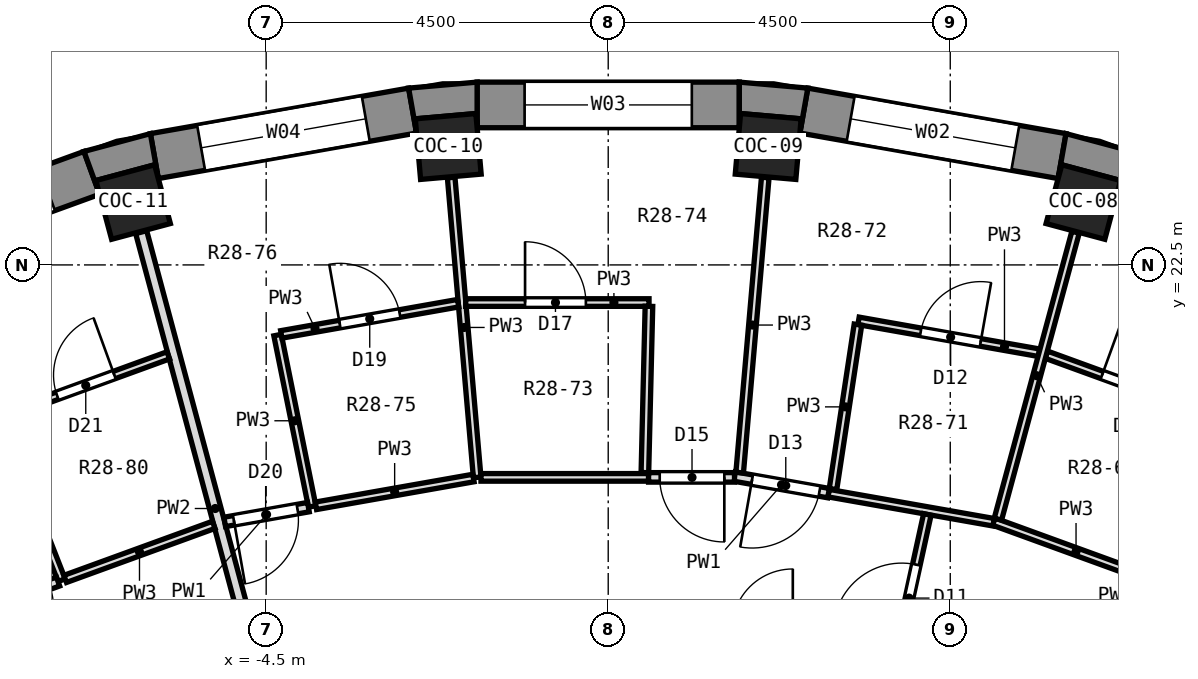
"""IFC4 building model, lengths in metres.
Left out: names, types, materials, properties, quantities, classifications, styles, units other than length and angle.
Written with IfcOpenShell. Run it as: python <this file> out.ifc"""

import sys

from ifc_helpers import new_model, si_unit, direction, frame, frame_2d, origin, origin_2d, place, context, subcontext, project, spatial, polyline, rectangle, outline, extrude, element, fill, save


model = new_model("IFC4")
c1 = context("Model", 3, precision=1e-05, world=origin(), true_north=direction((0.0, 1.0)))
c2 = subcontext(c1, "Body", "Model", "MODEL_VIEW")
j1 = project(units=[si_unit("LENGTHUNIT", "METRE"), si_unit("PLANEANGLEUNIT", "RADIAN")], contexts=[c1])
p1 = place(None, origin())
s1 = spatial("IfcSite", under=j1, at=p1, CompositionType="ELEMENT")
p2 = place(p1, origin())
s2 = spatial("IfcBuilding", under=s1, at=p2, CompositionType="ELEMENT")
p3 = place(p2, frame((0.0, 0.0, 190.5)))
s3 = spatial("IfcBuildingStorey", under=s2, at=p3, CompositionType="ELEMENT", Elevation=190.5)
for number, where, z_axis, x_axis in (
    (1, (6.25, 23.327, 0.0), (0.0, 0.0, 1.0), (0.259, 0.966, 0.0)),
    (2, (2.105, 24.058, 0.0), (0.0, 0.0, 1.0), (0.087, 0.996, 0.0)),
    (3, (-2.105, 24.058, 0.0), (0.0, 0.0, 1.0), (-0.087, 0.996, 0.0)),
    (4, (-6.25, 23.327, 0.0), (0.0, 0.0, 1.0), (-0.259, 0.966, 0.0)),
):
    element("IfcColumn", number, at=place(p3, frame(where, z_axis=z_axis, x_axis=x_axis)), inside=s3, PredefinedType="COLUMN", context=c2, shape_type="SweptSolid", body=[
        extrude(rectangle(XDim=0.8, YDim=0.8, at=origin_2d()), origin(), (0.0, 0.0, 1.0), 3.3),
    ])
p4 = place(p3, frame((10.036, 22.531, 0.0), z_axis=(0.0, 0.0, 1.0), x_axis=(-0.93968799822, 0.342032843455, 0.0)))
e5 = element("IfcWall", 5, at=p4, inside=s3, PredefinedType="SOLIDWALL", context=c2, shape_type="SweptSolid", body=[
    extrude(rectangle(XDim=3.45, YDim=0.6, at=frame_2d((1.725, 0.0))), origin(), (0.0, 0.0, 1.0), 2.85),
])
p5 = place(p4, frame((0.625, 0.0, 0.9)))
e6 = element("IfcOpeningElement", 6, at=p5, cuts=e5, PredefinedType="OPENING", context=c2, shape_type="SweptSolid", body=[
    extrude(rectangle(XDim=2.2, YDim=1.8, at=frame_2d((1.1, 0.9))), frame((0.0, 0.312, 0.0), z_axis=(0.0, -1.0, 0.0), x_axis=(1.0, 0.0, 0.0)), (0.0, 0.0, 1.0), 0.624),
])
p6 = place(p3, frame((5.971, 23.932, 0.0), z_axis=(0.0, 0.0, 1.0), x_axis=(-0.984814892183, 0.173607684551, 0.0)))
e7 = element("IfcWall", 7, at=p6, inside=s3, PredefinedType="SOLIDWALL", context=c2, shape_type="SweptSolid", body=[
    extrude(rectangle(XDim=3.45, YDim=0.6, at=frame_2d((1.725, 0.0))), origin(), (0.0, 0.0, 1.0), 2.85),
])
p7 = place(p6, frame((0.625, 0.0, 0.9)))
e8 = element("IfcOpeningElement", 8, at=p7, cuts=e7, PredefinedType="OPENING", context=c2, shape_type="SweptSolid", body=[
    extrude(rectangle(XDim=2.2, YDim=1.8, at=frame_2d((1.1, 0.9))), frame((0.0, 0.312, 0.0), z_axis=(0.0, -1.0, 0.0), x_axis=(1.0, 0.0, 0.0)), (0.0, 0.0, 1.0), 0.624),
])
p8 = place(p3, frame((1.725, 24.605, 0.0), z_axis=(0.0, 0.0, 1.0), x_axis=(-1.0, 0.0, 0.0)))
e9 = element("IfcWall", 9, at=p8, inside=s3, PredefinedType="SOLIDWALL", context=c2, shape_type="SweptSolid", body=[
    extrude(rectangle(XDim=3.45, YDim=0.6, at=frame_2d((1.725, 0.0))), origin(), (0.0, 0.0, 1.0), 2.85),
])
p9 = place(p8, frame((0.625, 0.0, 0.9)))
e10 = element("IfcOpeningElement", 10, at=p9, cuts=e9, PredefinedType="OPENING", context=c2, shape_type="SweptSolid", body=[
    extrude(rectangle(XDim=2.2, YDim=1.8, at=frame_2d((1.1, 0.9))), frame((0.0, 0.312, 0.0), z_axis=(0.0, -1.0, 0.0), x_axis=(1.0, 0.0, 0.0)), (0.0, 0.0, 1.0), 0.624),
])
p10 = place(p3, frame((-2.574, 24.531, 0.0), z_axis=(0.0, 0.0, 1.0), x_axis=(-0.984814892183, -0.173607684551, 0.0)))
e11 = element("IfcWall", 11, at=p10, inside=s3, PredefinedType="SOLIDWALL", context=c2, shape_type="SweptSolid", body=[
    extrude(rectangle(XDim=3.45, YDim=0.6, at=frame_2d((1.725, 0.0))), origin(), (0.0, 0.0, 1.0), 2.85),
])
p11 = place(p10, frame((0.625, 0.0, 0.9)))
e12 = element("IfcOpeningElement", 12, at=p11, cuts=e11, PredefinedType="OPENING", context=c2, shape_type="SweptSolid", body=[
    extrude(rectangle(XDim=2.2, YDim=1.8, at=frame_2d((1.1, 0.9))), frame((0.0, 0.312, 0.0), z_axis=(0.0, -1.0, 0.0), x_axis=(1.0, 0.0, 0.0)), (0.0, 0.0, 1.0), 0.624),
])
p12 = place(p3, frame((-6.794, 23.711, 0.0), z_axis=(0.0, 0.0, 1.0), x_axis=(-0.93968799822, -0.342032843455, 0.0)))
e13 = element("IfcWall", 13, at=p12, inside=s3, PredefinedType="SOLIDWALL", context=c2, shape_type="SweptSolid", body=[
    extrude(rectangle(XDim=3.45, YDim=0.6, at=frame_2d((1.725, 0.0))), origin(), (0.0, 0.0, 1.0), 2.85),
])
p13 = place(p12, frame((0.625, 0.0, 0.9)))
e14 = element("IfcOpeningElement", 14, at=p13, cuts=e13, PredefinedType="OPENING", context=c2, shape_type="SweptSolid", body=[
    extrude(rectangle(XDim=2.2, YDim=1.8, at=frame_2d((1.1, 0.9))), frame((0.0, 0.312, 0.0), z_axis=(0.0, -1.0, 0.0), x_axis=(1.0, 0.0, 0.0)), (0.0, 0.0, 1.0), 0.624),
])
p14 = place(p3, origin())
e15 = element("IfcWall", 15, at=p14, inside=s3, PredefinedType="SOLIDWALL", context=c2, shape_type="SweptSolid", body=[
    extrude(outline(polyline([(6.023, 24.227), (5.919, 23.636), (5.968, 23.817), (6.74, 23.61), (6.692, 23.429), (6.897, 23.993), (6.023, 24.227)])), origin(), (0.0, 0.0, 1.0), 2.85),
])
p15 = place(p3, origin())
e16 = element("IfcWall", 16, at=p15, inside=s3, PredefinedType="SOLIDWALL", context=c2, shape_type="SweptSolid", body=[
    extrude(outline(polyline([(2.626, 24.826), (1.725, 24.905), (1.725, 24.305), (1.741, 24.491), (2.538, 24.422), (2.522, 24.235), (2.626, 24.826)])), origin(), (0.0, 0.0, 1.0), 2.85),
])
p16 = place(p3, origin())
e17 = element("IfcWall", 17, at=p16, inside=s3, PredefinedType="SOLIDWALL", context=c2, shape_type="SweptSolid", body=[
    extrude(outline(polyline([(-1.725, 24.905), (-2.626, 24.826), (-2.522, 24.235), (-2.538, 24.422), (-1.741, 24.491), (-1.725, 24.305), (-1.725, 24.905)])), origin(), (0.0, 0.0, 1.0), 2.85),
])
p17 = place(p3, origin())
e18 = element("IfcWall", 18, at=p17, inside=s3, PredefinedType="SOLIDWALL", context=c2, shape_type="SweptSolid", body=[
    extrude(outline(polyline([(-6.023, 24.227), (-6.897, 23.993), (-6.692, 23.429), (-6.74, 23.61), (-5.968, 23.817), (-5.919, 23.636), (-6.023, 24.227)])), origin(), (0.0, 0.0, 1.0), 2.85),
])
p18 = place(p3, frame((-2.066, 23.65, 0.0), z_axis=(0.0, 0.0, 1.0), x_axis=(0.086382173885, -0.996262073972, 0.0)))
e19 = element("IfcWall", 19, at=p18, inside=s3, PredefinedType="PARTITIONING", context=c2, shape_type="SweptSolid", body=[
    extrude(rectangle(XDim=3.96, YDim=0.1, at=frame_2d((1.98, 0.0))), origin(), (0.0, 0.0, 1.0), 2.85),
])
p19 = place(p3, frame((-4.35, 21.577, 0.0), z_axis=(0.0, 0.0, 1.0), x_axis=(0.197830277374, -0.980236288532, 0.0)))
e20 = element("IfcWall", 20, at=p19, inside=s3, PredefinedType="PARTITIONING", context=c2, shape_type="SweptSolid", body=[
    extrude(rectangle(XDim=2.3, YDim=0.1, at=frame_2d((1.15, 0.0))), origin(), (0.0, 0.0, 1.0), 2.85),
])
p20 = place(p3, frame((-6.145, 22.931, 0.0), z_axis=(0.0, 0.0, 1.0), x_axis=(0.258855512824, -0.965916054055, 0.0)))
e21 = element("IfcWall", 21, at=p20, inside=s3, PredefinedType="PARTITIONING", context=c2, shape_type="SweptSolid", body=[
    extrude(rectangle(XDim=7.527, YDim=0.15, at=frame_2d((3.764, 0.0))), origin(), (0.0, 0.0, 1.0), 2.85),
])
p21 = place(p3, frame((-8.03, 20.494, 0.0), z_axis=(0.0, 0.0, 1.0), x_axis=(0.364775478286, -0.931095510912, 0.0)))
e22 = element("IfcWall", 22, at=p21, inside=s3, PredefinedType="PARTITIONING", context=c2, shape_type="SweptSolid", body=[
    extrude(rectangle(XDim=2.3, YDim=0.1, at=frame_2d((1.15, 0.0))), origin(), (0.0, 0.0, 1.0), 2.85),
])
p22 = place(p3, frame((5.071, 19.123, 0.0), z_axis=(0.0, 0.0, 1.0), x_axis=(0.939734670151, -0.34190459154, 0.0)))
e23 = element("IfcWall", 23, at=p22, inside=s3, PredefinedType="PARTITIONING", context=c2, shape_type="SweptSolid", body=[
    extrude(rectangle(XDim=2.306, YDim=0.1, at=frame_2d((1.153, 0.0))), origin(), (0.0, 0.0, 1.0), 2.85),
])
p23 = place(p3, frame((5.764, 21.319, 0.0), z_axis=(0.0, 0.0, 1.0), x_axis=(0.939672176826, -0.342076307422, 0.0)))
e24 = element("IfcWall", 24, at=p23, inside=s3, PredefinedType="PARTITIONING", context=c2, shape_type="SweptSolid", body=[
    extrude(rectangle(XDim=2.412, YDim=0.1, at=frame_2d((1.206, 0.0))), origin(), (0.0, 0.0, 1.0), 2.85),
])
p24 = place(p23, frame((0.781, 0.0, 0.0)))
e25 = element("IfcOpeningElement", 25, at=p24, cuts=e24, PredefinedType="OPENING", context=c2, shape_type="SweptSolid", body=[
    extrude(rectangle(XDim=0.8, YDim=2.1, at=frame_2d((0.4, 1.05))), frame((0.0, 0.062, 0.0), z_axis=(0.0, -1.0, 0.0), x_axis=(1.0, 0.0, 0.0)), (0.0, 0.0, 1.0), 0.124),
])
p25 = place(p3, frame((2.899, 19.498, 0.0), z_axis=(0.0, 0.0, 1.0), x_axis=(0.984790246942, -0.173747430277, 0.0)))
e26 = element("IfcWall", 26, at=p25, inside=s3, PredefinedType="PARTITIONING", context=c2, shape_type="SweptSolid", body=[
    extrude(rectangle(XDim=2.205, YDim=0.1, at=frame_2d((1.102, 0.0))), origin(), (0.0, 0.0, 1.0), 2.85),
])
p26 = place(p3, frame((1.662, 19.716, 0.0), z_axis=(0.0, 0.0, 1.0), x_axis=(0.984789427994, -0.173752071961, 0.0)))
e27 = element("IfcWall", 27, at=p26, inside=s3, PredefinedType="PARTITIONING", context=c2, shape_type="SweptSolid", body=[
    extrude(rectangle(XDim=1.256, YDim=0.125, at=frame_2d((0.628, 0.0))), origin(), (0.0, 0.0, 1.0), 2.85),
])
p27 = place(p26, frame((0.235, 0.0, 0.0)))
e28 = element("IfcOpeningElement", 28, at=p27, cuts=e27, PredefinedType="OPENING", context=c2, shape_type="SweptSolid", body=[
    extrude(rectangle(XDim=0.9, YDim=2.1, at=frame_2d((0.45, 1.05))), frame((0.0, 0.074, 0.0), z_axis=(0.0, -1.0, 0.0), x_axis=(1.0, 0.0, 0.0)), (0.0, 0.0, 1.0), 0.149),
])
p28 = place(p3, frame((3.293, 21.764, 0.0), z_axis=(0.0, 0.0, 1.0), x_axis=(0.984775404062, -0.173831537861, 0.0)))
e29 = element("IfcWall", 29, at=p28, inside=s3, PredefinedType="PARTITIONING", context=c2, shape_type="SweptSolid", body=[
    extrude(rectangle(XDim=2.411, YDim=0.1, at=frame_2d((1.206, 0.0))), origin(), (0.0, 0.0, 1.0), 2.85),
])
p29 = place(p28, frame((0.831, 0.0, 0.0)))
e30 = element("IfcOpeningElement", 30, at=p29, cuts=e29, PredefinedType="OPENING", context=c2, shape_type="SweptSolid", body=[
    extrude(rectangle(XDim=0.8, YDim=2.1, at=frame_2d((0.4, 1.05))), frame((0.0, 0.062, 0.0), z_axis=(0.0, -1.0, 0.0), x_axis=(1.0, 0.0, 0.0)), (0.0, 0.0, 1.0), 0.124),
])
p30 = place(p3, frame((-1.674, 19.705, 0.0), z_axis=(0.0, 0.0, 1.0), x_axis=(1.0, 0.0, 0.0)))
e31 = element("IfcWall", 31, at=p30, inside=s3, PredefinedType="PARTITIONING", context=c2, shape_type="SweptSolid", body=[
    extrude(rectangle(XDim=2.205, YDim=0.1, at=frame_2d((1.103, 0.0))), origin(), (0.0, 0.0, 1.0), 2.85),
])
p31 = place(p3, frame((0.531, 19.705, 0.0), z_axis=(0.0, 0.0, 1.0), x_axis=(1.0, 0.0, 0.0)))
e32 = element("IfcWall", 32, at=p31, inside=s3, PredefinedType="PARTITIONING", context=c2, shape_type="SweptSolid", body=[
    extrude(rectangle(XDim=1.131, YDim=0.125, at=frame_2d((0.565, 0.0))), origin(), (0.0, 0.0, 1.0), 2.85),
])
p32 = place(p31, frame((0.146, 0.0, 0.0)))
e33 = element("IfcOpeningElement", 33, at=p32, cuts=e32, PredefinedType="OPENING", context=c2, shape_type="SweptSolid", body=[
    extrude(rectangle(XDim=0.85, YDim=2.1, at=frame_2d((0.425, 1.05))), frame((0.0, 0.074, 0.0), z_axis=(0.0, -1.0, 0.0), x_axis=(1.0, 0.0, 0.0)), (0.0, 0.0, 1.0), 0.149),
])
p33 = place(p3, frame((-1.875, 22.005, 0.0), z_axis=(0.0, 0.0, 1.0), x_axis=(1.0, 0.0, 0.0)))
e34 = element("IfcWall", 34, at=p33, inside=s3, PredefinedType="PARTITIONING", context=c2, shape_type="SweptSolid", body=[
    extrude(rectangle(XDim=2.412, YDim=0.1, at=frame_2d((1.206, 0.0))), origin(), (0.0, 0.0, 1.0), 2.85),
])
p34 = place(p33, frame((0.781, 0.0, 0.0)))
e35 = element("IfcOpeningElement", 35, at=p34, cuts=e34, PredefinedType="OPENING", context=c2, shape_type="SweptSolid", body=[
    extrude(rectangle(XDim=0.8, YDim=2.1, at=frame_2d((0.4, 1.05))), frame((0.0, 0.062, 0.0), z_axis=(0.0, -1.0, 0.0), x_axis=(1.0, 0.0, 0.0)), (0.0, 0.0, 1.0), 0.124),
])
p35 = place(p3, frame((-3.846, 19.331, 0.0), z_axis=(0.0, 0.0, 1.0), x_axis=(0.984784726653, 0.173778716047, 0.0)))
e36 = element("IfcWall", 36, at=p35, inside=s3, PredefinedType="PARTITIONING", context=c2, shape_type="SweptSolid", body=[
    extrude(rectangle(XDim=2.104, YDim=0.1, at=frame_2d((1.052, 0.0))), origin(), (0.0, 0.0, 1.0), 2.85),
])
p36 = place(p3, frame((-5.045, 19.119, 0.0), z_axis=(0.0, 0.0, 1.0), x_axis=(0.984809932548, 0.173635816451, 0.0)))
e37 = element("IfcWall", 37, at=p36, inside=s3, PredefinedType="PARTITIONING", context=c2, shape_type="SweptSolid", body=[
    extrude(rectangle(XDim=1.118, YDim=0.125, at=frame_2d((0.559, 0.0))), origin(), (0.0, 0.0, 1.0), 2.85),
])
p37 = place(p36, frame((0.122, 0.0, 0.0)))
e38 = element("IfcOpeningElement", 38, at=p37, cuts=e37, PredefinedType="OPENING", context=c2, shape_type="SweptSolid", body=[
    extrude(rectangle(XDim=0.85, YDim=2.1, at=frame_2d((0.425, 1.05))), frame((0.0, 0.074, 0.0), z_axis=(0.0, -1.0, 0.0), x_axis=(1.0, 0.0, 0.0)), (0.0, 0.0, 1.0), 0.149),
])
p38 = place(p3, frame((-4.301, 21.586, 0.0), z_axis=(0.0, 0.0, 1.0), x_axis=(0.984779397408, 0.173808913582, 0.0)))
e39 = element("IfcWall", 39, at=p38, inside=s3, PredefinedType="PARTITIONING", context=c2, shape_type="SweptSolid", body=[
    extrude(rectangle(XDim=2.363, YDim=0.1, at=frame_2d((1.181, 0.0))), origin(), (0.0, 0.0, 1.0), 2.85),
])
p39 = place(p38, frame((0.781, 0.0, 0.0)))
e40 = element("IfcOpeningElement", 40, at=p39, cuts=e39, PredefinedType="OPENING", context=c2, shape_type="SweptSolid", body=[
    extrude(rectangle(XDim=0.8, YDim=2.1, at=frame_2d((0.4, 1.05))), frame((0.0, 0.062, 0.0), z_axis=(0.0, -1.0, 0.0), x_axis=(1.0, 0.0, 0.0)), (0.0, 0.0, 1.0), 0.124),
])
p40 = place(p3, frame((-7.144, 18.369, 0.0), z_axis=(0.0, 0.0, 1.0), x_axis=(0.939728291625, 0.341922122596, 0.0)))
e41 = element("IfcWall", 41, at=p40, inside=s3, PredefinedType="PARTITIONING", context=c2, shape_type="SweptSolid", body=[
    extrude(rectangle(XDim=2.08, YDim=0.1, at=frame_2d((1.04, 0.0))), origin(), (0.0, 0.0, 1.0), 2.85),
])
p41 = place(p3, frame((-8.312, 17.944, 0.0), z_axis=(0.0, 0.0, 1.0), x_axis=(0.939699833517, 0.34200032586, 0.0)))
e42 = element("IfcWall", 42, at=p41, inside=s3, PredefinedType="PARTITIONING", context=c2, shape_type="SweptSolid", body=[
    extrude(rectangle(XDim=1.143, YDim=0.125, at=frame_2d((0.571, 0.0))), origin(), (0.0, 0.0, 1.0), 2.85),
])
p42 = place(p41, frame((0.122, 0.0, 0.0)))
e43 = element("IfcOpeningElement", 43, at=p42, cuts=e42, PredefinedType="OPENING", context=c2, shape_type="SweptSolid", body=[
    extrude(rectangle(XDim=0.9, YDim=2.1, at=frame_2d((0.45, 1.05))), frame((0.0, 0.074, 0.0), z_axis=(0.0, -1.0, 0.0), x_axis=(1.0, 0.0, 0.0)), (0.0, 0.0, 1.0), 0.149),
])
p43 = place(p3, frame((-7.983, 20.511, 0.0), z_axis=(0.0, 0.0, 1.0), x_axis=(0.939652995513, 0.342128993251, 0.0)))
e44 = element("IfcWall", 44, at=p43, inside=s3, PredefinedType="PARTITIONING", context=c2, shape_type="SweptSolid", body=[
    extrude(rectangle(XDim=2.336, YDim=0.1, at=frame_2d((1.168, 0.0))), origin(), (0.0, 0.0, 1.0), 2.85),
])
p44 = place(p43, frame((0.781, 0.0, 0.0)))
e45 = element("IfcOpeningElement", 45, at=p44, cuts=e44, PredefinedType="OPENING", context=c2, shape_type="SweptSolid", body=[
    extrude(rectangle(XDim=0.8, YDim=2.1, at=frame_2d((0.4, 1.05))), frame((0.0, 0.062, 0.0), z_axis=(0.0, -1.0, 0.0), x_axis=(1.0, 0.0, 0.0)), (0.0, 0.0, 1.0), 0.124),
])
p45 = place(p3, frame((5.127, 19.156, 0.0), z_axis=(0.0, 0.0, 1.0), x_axis=(0.261236113371, 0.965274931339, 0.0)))
e46 = element("IfcWall", 46, at=p45, inside=s3, PredefinedType="PARTITIONING", context=c2, shape_type="SweptSolid", body=[
    extrude(rectangle(XDim=3.91, YDim=0.1, at=frame_2d((1.955, 0.0))), origin(), (0.0, 0.0, 1.0), 2.85),
])
p46 = place(p3, frame((3.421, 15.661, 0.0), z_axis=(0.0, 0.0, 1.0), x_axis=(0.213434819618, 0.976957306014, 0.0)))
e47 = element("IfcWall", 47, at=p46, inside=s3, PredefinedType="PARTITIONING", context=c2, shape_type="SweptSolid", body=[
    extrude(rectangle(XDim=3.64, YDim=0.1, at=frame_2d((1.82, 0.0))), origin(), (0.0, 0.0, 1.0), 2.85),
])
p47 = place(p46, frame((2.064, 0.0, 0.0)))
e48 = element("IfcOpeningElement", 48, at=p47, cuts=e47, PredefinedType="OPENING", context=c2, shape_type="SweptSolid", body=[
    extrude(rectangle(XDim=0.9, YDim=2.1, at=frame_2d((0.45, 1.05))), frame((0.0, 0.062, 0.0), z_axis=(0.0, -1.0, 0.0), x_axis=(1.0, 0.0, 0.0)), (0.0, 0.0, 1.0), 0.124),
])
p48 = place(p3, frame((2.957, 19.551, 0.0), z_axis=(0.0, 0.0, 1.0), x_axis=(0.149927646316, 0.988696971205, 0.0)))
e49 = element("IfcWall", 49, at=p48, inside=s3, PredefinedType="PARTITIONING", context=c2, shape_type="SweptSolid", body=[
    extrude(rectangle(XDim=2.188, YDim=0.1, at=frame_2d((1.094, 0.0))), origin(), (0.0, 0.0, 1.0), 2.85),
])
p49 = place(p3, frame((1.729, 19.767, 0.0), z_axis=(0.0, 0.0, 1.0), x_axis=(0.086389019771, 0.996261480367, 0.0)))
e50 = element("IfcWall", 50, at=p49, inside=s3, PredefinedType="PARTITIONING", context=c2, shape_type="SweptSolid", body=[
    extrude(rectangle(XDim=3.897, YDim=0.1, at=frame_2d((1.949, 0.0))), origin(), (0.0, 0.0, 1.0), 2.85),
])
p50 = place(p3, frame((0.482, 19.768, 0.0), z_axis=(0.0, 0.0, 1.0), x_axis=(0.024434666623, 0.999701428961, 0.0)))
e51 = element("IfcWall", 51, at=p50, inside=s3, PredefinedType="PARTITIONING", context=c2, shape_type="SweptSolid", body=[
    extrude(rectangle(XDim=2.188, YDim=0.1, at=frame_2d((1.094, 0.0))), origin(), (0.0, 0.0, 1.0), 2.85),
])
p51 = place(p7, origin())
e52 = element("IfcWindow", 52, at=p51, inside=s3, PartitioningType="SINGLE_PANEL", PredefinedType="WINDOW", context=c2, shape_type="SweptSolid", body=[
    extrude(rectangle(XDim=2.2, YDim=1.8, at=frame_2d((1.1, 0.9))), frame((0.0, 0.18, 0.0), z_axis=(0.0, -1.0, 0.0), x_axis=(1.0, 0.0, 0.0)), (0.0, 0.0, 1.0), 0.06),
])
fill(e8, e52)
p52 = place(p9, origin())
e53 = element("IfcWindow", 53, at=p52, inside=s3, PartitioningType="SINGLE_PANEL", PredefinedType="WINDOW", context=c2, shape_type="SweptSolid", body=[
    extrude(rectangle(XDim=2.2, YDim=1.8, at=frame_2d((1.1, 0.9))), frame((0.0, 0.18, 0.0), z_axis=(0.0, -1.0, 0.0), x_axis=(1.0, 0.0, 0.0)), (0.0, 0.0, 1.0), 0.06),
])
fill(e10, e53)
p53 = place(p11, origin())
e54 = element("IfcWindow", 54, at=p53, inside=s3, PartitioningType="SINGLE_PANEL", PredefinedType="WINDOW", context=c2, shape_type="SweptSolid", body=[
    extrude(rectangle(XDim=2.2, YDim=1.8, at=frame_2d((1.1, 0.9))), frame((0.0, 0.18, 0.0), z_axis=(0.0, -1.0, 0.0), x_axis=(1.0, 0.0, 0.0)), (0.0, 0.0, 1.0), 0.06),
])
fill(e12, e54)
p54 = place(p24, origin())
e55 = element("IfcDoor", 55, at=p54, inside=s3, OperationType="SINGLE_SWING_LEFT", PredefinedType="DOOR", context=c2, shape_type="SweptSolid", body=[
    extrude(rectangle(XDim=0.8, YDim=2.1, at=frame_2d((0.4, 1.05))), frame((0.0, 0.025, 0.0), z_axis=(0.0, -1.0, 0.0), x_axis=(1.0, 0.0, 0.0)), (0.0, 0.0, 1.0), 0.05),
])
fill(e25, e55)
p55 = place(p47, origin())
e56 = element("IfcDoor", 56, at=p55, inside=s3, OperationType="SINGLE_SWING_LEFT", PredefinedType="DOOR", context=c2, shape_type="SweptSolid", body=[
    extrude(rectangle(XDim=0.9, YDim=2.1, at=frame_2d((0.45, 1.05))), frame((0.0, 0.025, 0.0), z_axis=(0.0, -1.0, 0.0), x_axis=(1.0, 0.0, 0.0)), (0.0, 0.0, 1.0), 0.05),
])
fill(e48, e56)
p56 = place(p29, origin())
e57 = element("IfcDoor", 57, at=p56, inside=s3, OperationType="SINGLE_SWING_RIGHT", PredefinedType="DOOR", context=c2, shape_type="SweptSolid", body=[
    extrude(rectangle(XDim=0.8, YDim=2.1, at=frame_2d((0.4, 1.05))), frame((0.0, 0.025, 0.0), z_axis=(0.0, -1.0, 0.0), x_axis=(1.0, 0.0, 0.0)), (0.0, 0.0, 1.0), 0.05),
])
fill(e30, e57)
p57 = place(p27, frame((0.9, 0.0, 0.0), z_axis=(0.0, 0.0, 1.0), x_axis=(-1.0, 0.0, 0.0)))
e58 = element("IfcDoor", 58, at=p57, inside=s3, OperationType="SINGLE_SWING_RIGHT", PredefinedType="DOOR", context=c2, shape_type="SweptSolid", body=[
    extrude(rectangle(XDim=0.9, YDim=2.1, at=frame_2d((0.45, 1.05))), frame((0.0, 0.025, 0.0), z_axis=(0.0, -1.0, 0.0), x_axis=(1.0, 0.0, 0.0)), (0.0, 0.0, 1.0), 0.05),
])
fill(e28, e58)
p58 = place(p32, frame((0.85, 0.0, 0.0), z_axis=(0.0, 0.0, 1.0), x_axis=(-1.0, 0.0, 0.0)))
e59 = element("IfcDoor", 59, at=p58, inside=s3, OperationType="SINGLE_SWING_LEFT", PredefinedType="DOOR", context=c2, shape_type="SweptSolid", body=[
    extrude(rectangle(XDim=0.85, YDim=2.1, at=frame_2d((0.425, 1.05))), frame((0.0, 0.025, 0.0), z_axis=(0.0, -1.0, 0.0), x_axis=(1.0, 0.0, 0.0)), (0.0, 0.0, 1.0), 0.05),
])
fill(e33, e59)
p59 = place(p34, origin())
e60 = element("IfcDoor", 60, at=p59, inside=s3, OperationType="SINGLE_SWING_LEFT", PredefinedType="DOOR", context=c2, shape_type="SweptSolid", body=[
    extrude(rectangle(XDim=0.8, YDim=2.1, at=frame_2d((0.4, 1.05))), frame((0.0, 0.025, 0.0), z_axis=(0.0, -1.0, 0.0), x_axis=(1.0, 0.0, 0.0)), (0.0, 0.0, 1.0), 0.05),
])
fill(e35, e60)
p60 = place(p39, origin())
e61 = element("IfcDoor", 61, at=p60, inside=s3, OperationType="SINGLE_SWING_LEFT", PredefinedType="DOOR", context=c2, shape_type="SweptSolid", body=[
    extrude(rectangle(XDim=0.8, YDim=2.1, at=frame_2d((0.4, 1.05))), frame((0.0, 0.025, 0.0), z_axis=(0.0, -1.0, 0.0), x_axis=(1.0, 0.0, 0.0)), (0.0, 0.0, 1.0), 0.05),
])
fill(e40, e61)
p61 = place(p37, frame((0.85, 0.0, 0.0), z_axis=(0.0, 0.0, 1.0), x_axis=(-1.0, 0.0, 0.0)))
e62 = element("IfcDoor", 62, at=p61, inside=s3, OperationType="SINGLE_SWING_RIGHT", PredefinedType="DOOR", context=c2, shape_type="SweptSolid", body=[
    extrude(rectangle(XDim=0.85, YDim=2.1, at=frame_2d((0.425, 1.05))), frame((0.0, 0.025, 0.0), z_axis=(0.0, -1.0, 0.0), x_axis=(1.0, 0.0, 0.0)), (0.0, 0.0, 1.0), 0.05),
])
fill(e38, e62)
p62 = place(p44, origin())
e63 = element("IfcDoor", 63, at=p62, inside=s3, OperationType="SINGLE_SWING_RIGHT", PredefinedType="DOOR", context=c2, shape_type="SweptSolid", body=[
    extrude(rectangle(XDim=0.8, YDim=2.1, at=frame_2d((0.4, 1.05))), frame((0.0, 0.025, 0.0), z_axis=(0.0, -1.0, 0.0), x_axis=(1.0, 0.0, 0.0)), (0.0, 0.0, 1.0), 0.05),
])
fill(e45, e63)
save(model, sys.argv[1])
